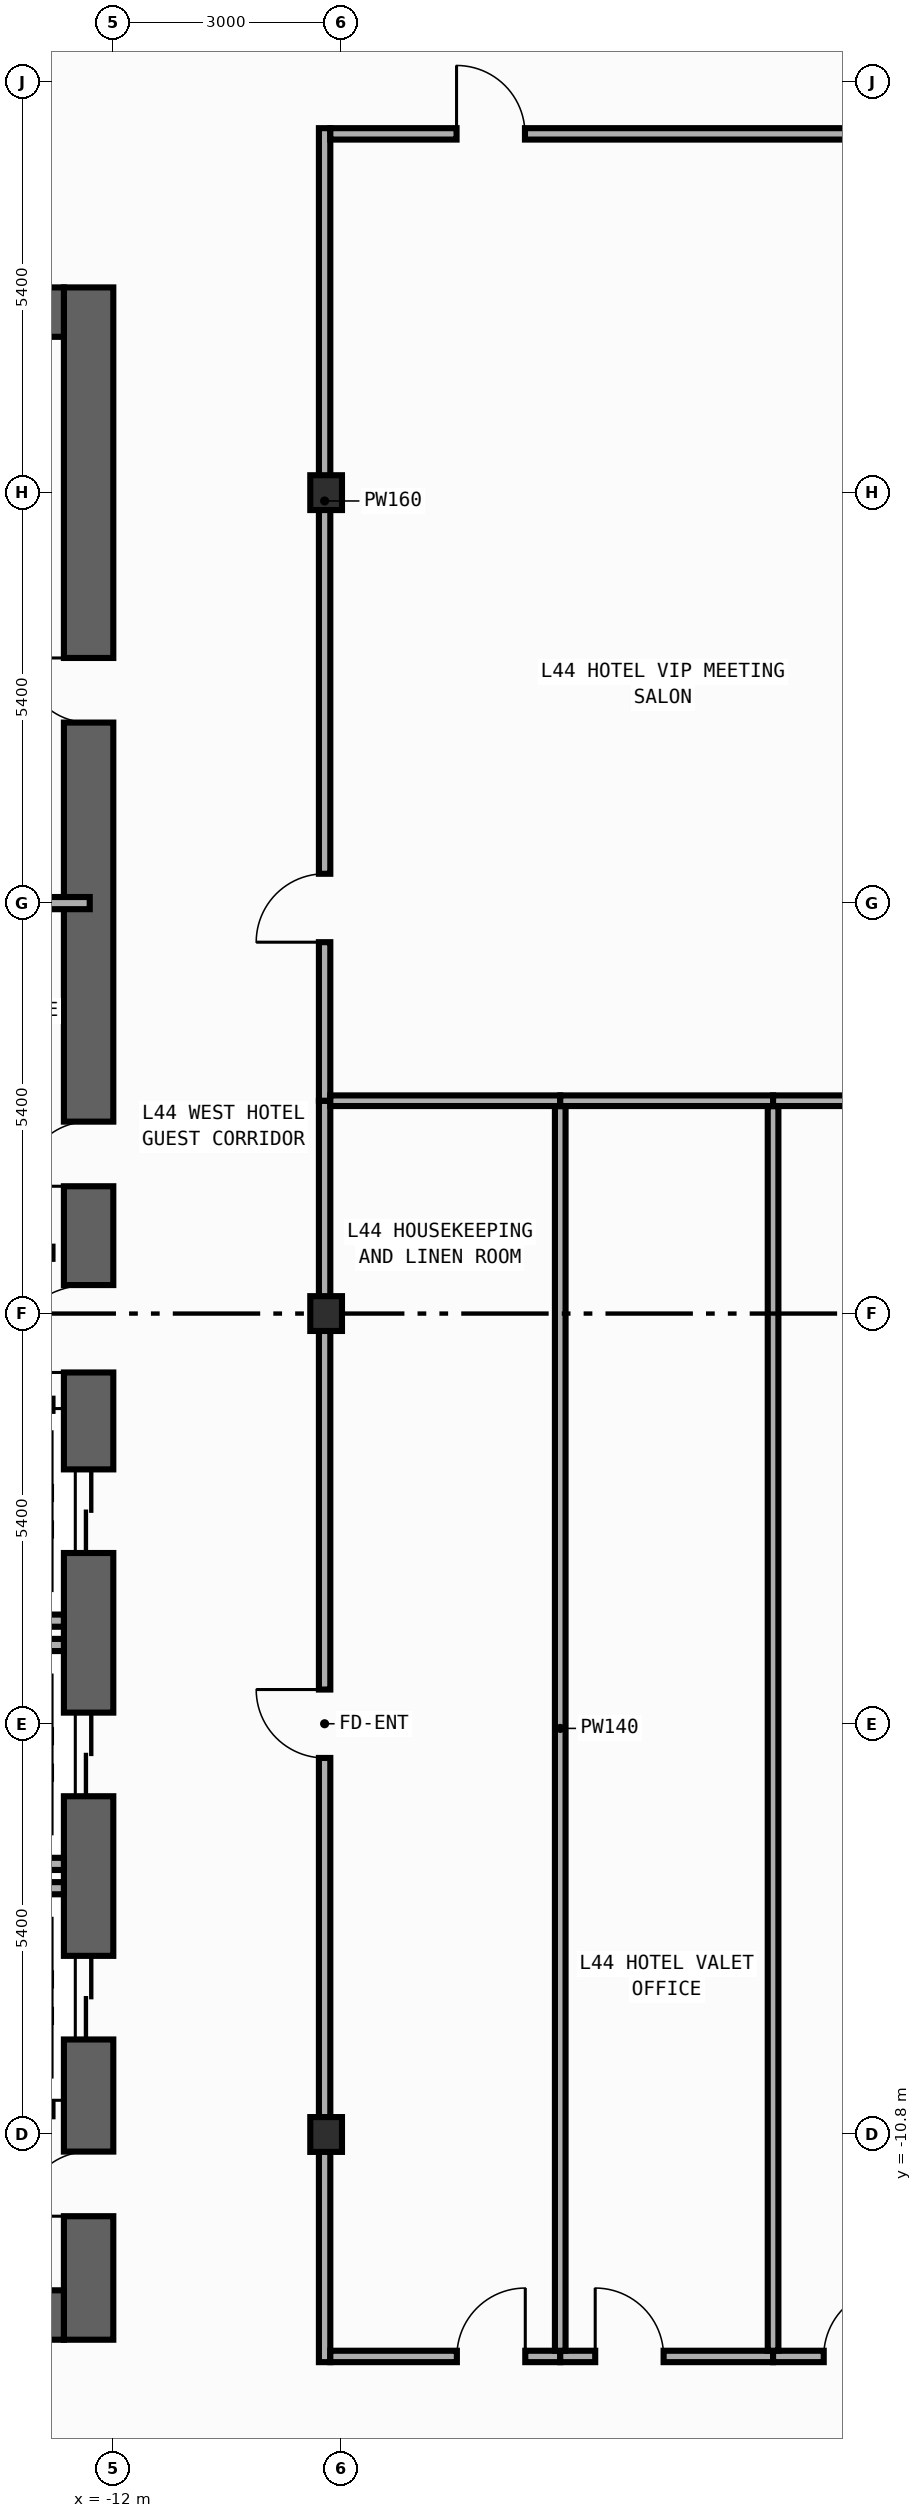
"""IFC4 building model, lengths in metres.
Left out: names, types, materials, properties, quantities, classifications, styles, units other than length and angle.
Written with IfcOpenShell. Run it as: python <this file> out.ifc"""

import sys

from ifc_helpers import new_model, si_unit, direction, frame, frame_2d, origin, origin_2d, place, context, subcontext, project, spatial, rectangle, i_section, extrude, element, fill, save


model = new_model("IFC4")
c1 = context("Model", 3, precision=1e-05, world=origin(), true_north=direction((0.0, 1.0)))
c2 = subcontext(c1, "Body", "Model", "MODEL_VIEW")
j1 = project(units=[si_unit("LENGTHUNIT", "METRE"), si_unit("PLANEANGLEUNIT", "RADIAN")], contexts=[c1])
p1 = place(None, origin())
s1 = spatial("IfcSite", under=j1, at=p1, CompositionType="ELEMENT")
p2 = place(p1, origin())
s2 = spatial("IfcBuilding", under=s1, at=p2, CompositionType="ELEMENT")
p3 = place(p2, frame((0.0, 0.0, 191.6)))
s3 = spatial("IfcBuildingStorey", under=s2, at=p3, CompositionType="ELEMENT", Elevation=191.6)
p4 = place(p3, frame((-12.325, -13.5, 0.0), z_axis=(0.0, 0.0, 1.0), x_axis=(0.0, 1.0, 0.0)))
e1 = element("IfcWall", 1, at=p4, inside=s3, PredefinedType="SHEAR", context=c2, shape_type="SweptSolid", body=[
    extrude(rectangle(XDim=27.0, YDim=0.65, at=frame_2d((13.5, 0.0))), origin(), (0.0, 0.0, 1.0), 3.54),
])
p5 = place(p4, frame((10.35, 0.0, 0.0)))
e2 = element("IfcOpeningElement", 2, at=p5, cuts=e1, PredefinedType="OPENING", context=c2, shape_type="SweptSolid", body=[
    extrude(rectangle(XDim=1.1, YDim=2.2, at=frame_2d((0.55, 1.1))), frame((0.0, 0.335, 0.0), z_axis=(0.0, -1.0, 0.0), x_axis=(1.0, 0.0, 0.0)), (0.0, 0.0, 1.0), 0.67),
])
p6 = place(p4, frame((7.15, 0.0, 0.0)))
e3 = element("IfcOpeningElement", 3, at=p6, cuts=e1, PredefinedType="OPENING", context=c2, shape_type="SweptSolid", body=[
    extrude(rectangle(XDim=1.1, YDim=2.2, at=frame_2d((0.55, 1.1))), frame((0.0, 0.335, 0.0), z_axis=(0.0, -1.0, 0.0), x_axis=(1.0, 0.0, 0.0)), (0.0, 0.0, 1.0), 0.67),
])
p7 = place(p4, frame((3.95, 0.0, 0.0)))
e4 = element("IfcOpeningElement", 4, at=p7, cuts=e1, PredefinedType="OPENING", context=c2, shape_type="SweptSolid", body=[
    extrude(rectangle(XDim=1.1, YDim=2.2, at=frame_2d((0.55, 1.1))), frame((0.0, 0.335, 0.0), z_axis=(0.0, -1.0, 0.0), x_axis=(1.0, 0.0, 0.0)), (0.0, 0.0, 1.0), 0.67),
])
p8 = place(p4, frame((15.175, 0.0, 0.0)))
e5 = element("IfcOpeningElement", 5, at=p8, cuts=e1, PredefinedType="OPENING", context=c2, shape_type="SweptSolid", body=[
    extrude(rectangle(XDim=0.85, YDim=2.1, at=frame_2d((0.425, 1.05))), frame((0.0, 0.335, 0.0), z_axis=(0.0, -1.0, 0.0), x_axis=(1.0, 0.0, 0.0)), (0.0, 0.0, 1.0), 0.67),
])
p9 = place(p4, frame((21.275, 0.0, 0.0)))
e6 = element("IfcOpeningElement", 6, at=p9, cuts=e1, PredefinedType="OPENING", context=c2, shape_type="SweptSolid", body=[
    extrude(rectangle(XDim=0.85, YDim=2.1, at=frame_2d((0.425, 1.05))), frame((0.0, 0.335, 0.0), z_axis=(0.0, -1.0, 0.0), x_axis=(1.0, 0.0, 0.0)), (0.0, 0.0, 1.0), 0.67),
])
p10 = place(p4, frame((12.725, 0.0, 0.0)))
e7 = element("IfcOpeningElement", 7, at=p10, cuts=e1, PredefinedType="OPENING", context=c2, shape_type="SweptSolid", body=[
    extrude(rectangle(XDim=1.15, YDim=2.2, at=frame_2d((0.575, 1.1))), frame((0.0, 0.335, 0.0), z_axis=(0.0, -1.0, 0.0), x_axis=(1.0, 0.0, 0.0)), (0.0, 0.0, 1.0), 0.67),
])
p11 = place(p4, frame((1.625, 0.0, 0.0)))
e8 = element("IfcOpeningElement", 8, at=p11, cuts=e1, PredefinedType="OPENING", context=c2, shape_type="SweptSolid", body=[
    extrude(rectangle(XDim=0.85, YDim=2.1, at=frame_2d((0.425, 1.05))), frame((0.0, 0.335, 0.0), z_axis=(0.0, -1.0, 0.0), x_axis=(1.0, 0.0, 0.0)), (0.0, 0.0, 1.0), 0.67),
])
for number, where, z_axis, x_axis in (
    (9, (-19.75, -13.175, 0.0), (0.0, 0.0, 1.0), (1.0, 0.0, 0.0)),
    (10, (-19.75, 13.175, 0.0), (0.0, 0.0, 1.0), (1.0, 0.0, 0.0)),
):
    element("IfcWall", number, at=place(p3, frame(where, z_axis=z_axis, x_axis=x_axis)), inside=s3, PredefinedType="SHEAR", context=c2, shape_type="SweptSolid", body=[
        extrude(rectangle(XDim=7.1, YDim=0.65, at=frame_2d((3.55, 0.0))), origin(), (0.0, 0.0, 1.0), 3.54),
    ])
for number, where, z_axis, x_axis in (
    (11, (-9.2, -10.8, 0.0), (0.0, 0.0, 1.0), (1.0, 0.0, 0.0)),
    (12, (-9.2, 0.0, 0.0), (0.0, 0.0, 1.0), (1.0, 0.0, 0.0)),
    (13, (-9.2, 10.8, 0.0), (0.0, 0.0, 1.0), (1.0, 0.0, 0.0)),
):
    element("IfcColumn", number, at=place(p3, frame(where, z_axis=z_axis, x_axis=x_axis)), inside=s3, PredefinedType="COLUMN", context=c2, shape_type="SweptSolid", body=[
        extrude(i_section(OverallWidth=0.417, OverallDepth=0.458, WebThickness=0.03, FlangeThickness=0.05, FilletRadius=0.022, at=origin_2d()), origin(), (0.0, 0.0, 1.0), 3.8),
    ])
for number, where, z_axis, x_axis in (
    (14, (-14.99, -4.04, 0.0), (0.0, 0.0, 1.0), (1.0, 0.0, 0.0)),
    (15, (-14.99, -7.24, 0.0), (0.0, 0.0, 1.0), (1.0, 0.0, 0.0)),
    (16, (-14.99, -4.36, 0.0), (0.0, 0.0, 1.0), (1.0, 0.0, 0.0)),
    (17, (-14.99, -7.56, 0.0), (0.0, 0.0, 1.0), (1.0, 0.0, 0.0)),
):
    element("IfcWall", number, at=place(p3, frame(where, z_axis=z_axis, x_axis=x_axis)), inside=s3, PredefinedType="STANDARD", context=c2, shape_type="SweptSolid", body=[
        extrude(rectangle(XDim=2.34, YDim=0.16, at=frame_2d((1.17, 0.0))), origin(), (0.0, 0.0, 1.0), 3.54),
    ])
p12 = place(p3, frame((-15.375, 5.4, 0.0), z_axis=(0.0, 0.0, 1.0), x_axis=(1.0, 0.0, 0.0)))
e18 = element("IfcWall", 18, at=p12, inside=s3, PredefinedType="PARTITIONING", context=c2, shape_type="SweptSolid", body=[
    extrude(rectangle(XDim=3.065, YDim=0.16, at=frame_2d((1.532, 0.0))), origin(), (0.0, 0.0, 1.0), 3.54),
])
p13 = place(p3, frame((-9.22, -13.795, 0.0), z_axis=(0.0, 0.0, 1.0), x_axis=(0.0, 1.0, 0.0)))
e19 = element("IfcWall", 19, at=p13, inside=s3, PredefinedType="PARTITIONING", context=c2, shape_type="SweptSolid", body=[
    extrude(rectangle(XDim=16.595, YDim=0.15, at=frame_2d((8.297, 0.0))), origin(), (0.0, 0.0, 1.0), 2.952),
])
p14 = place(p13, frame((7.949, 0.0, 0.0)))
e20 = element("IfcOpeningElement", 20, at=p14, cuts=e19, PredefinedType="OPENING", context=c2, shape_type="SweptSolid", body=[
    extrude(rectangle(XDim=0.9, YDim=2.15, at=frame_2d((0.45, 1.075))), frame((0.0, 0.085, 0.0), z_axis=(0.0, -1.0, 0.0), x_axis=(1.0, 0.0, 0.0)), (0.0, 0.0, 1.0), 0.17),
])
p15 = place(p3, frame((-9.22, 2.8, 0.0), z_axis=(0.0, 0.0, 1.0), x_axis=(0.0, 1.0, 0.0)))
e21 = element("IfcWall", 21, at=p15, inside=s3, PredefinedType="PARTITIONING", context=c2, shape_type="SweptSolid", body=[
    extrude(rectangle(XDim=12.795, YDim=0.15, at=frame_2d((6.397, 0.0))), origin(), (0.0, 0.0, 1.0), 2.952),
])
p16 = place(p15, frame((2.086, 0.0, 0.0)))
e22 = element("IfcOpeningElement", 22, at=p16, cuts=e21, PredefinedType="OPENING", context=c2, shape_type="SweptSolid", body=[
    extrude(rectangle(XDim=0.9, YDim=2.15, at=frame_2d((0.45, 1.075))), frame((0.0, 0.085, 0.0), z_axis=(0.0, -1.0, 0.0), x_axis=(1.0, 0.0, 0.0)), (0.0, 0.0, 1.0), 0.17),
])
p17 = place(p3, frame((-9.145, 15.52, 0.0), z_axis=(0.0, 0.0, 1.0), x_axis=(1.0, 0.0, 0.0)))
e23 = element("IfcWall", 23, at=p17, inside=s3, PredefinedType="PARTITIONING", context=c2, shape_type="SweptSolid", body=[
    extrude(rectangle(XDim=8.825, YDim=0.15, at=frame_2d((4.413, 0.0))), origin(), (0.0, 0.0, 1.0), 3.54),
])
p18 = place(p17, frame((1.661, 0.0, 0.0)))
e24 = element("IfcOpeningElement", 24, at=p18, cuts=e23, PredefinedType="OPENING", context=c2, shape_type="SweptSolid", body=[
    extrude(rectangle(XDim=0.9, YDim=2.15, at=frame_2d((0.45, 1.075))), frame((0.0, 0.085, 0.0), z_axis=(0.0, -1.0, 0.0), x_axis=(1.0, 0.0, 0.0)), (0.0, 0.0, 1.0), 0.17),
])
p19 = place(p3, frame((-9.145, -13.72, 0.0), z_axis=(0.0, 0.0, 1.0), x_axis=(1.0, 0.0, 0.0)))
e25 = element("IfcWall", 25, at=p19, inside=s3, PredefinedType="PARTITIONING", context=c2, shape_type="SweptSolid", body=[
    extrude(rectangle(XDim=3.025, YDim=0.15, at=frame_2d((1.512, 0.0))), origin(), (0.0, 0.0, 1.0), 3.54),
])
p20 = place(p19, frame((1.665, 0.0, 0.0)))
e26 = element("IfcOpeningElement", 26, at=p20, cuts=e25, PredefinedType="OPENING", context=c2, shape_type="SweptSolid", body=[
    extrude(rectangle(XDim=0.9, YDim=2.15, at=frame_2d((0.45, 1.075))), frame((0.0, 0.085, 0.0), z_axis=(0.0, -1.0, 0.0), x_axis=(1.0, 0.0, 0.0)), (0.0, 0.0, 1.0), 0.17),
])
p21 = place(p3, frame((-6.12, -13.72, 0.0), z_axis=(0.0, 0.0, 1.0), x_axis=(1.0, 0.0, 0.0)))
e27 = element("IfcWall", 27, at=p21, inside=s3, PredefinedType="PARTITIONING", context=c2, shape_type="SweptSolid", body=[
    extrude(rectangle(XDim=2.8, YDim=0.15, at=frame_2d((1.4, 0.0))), origin(), (0.0, 0.0, 1.0), 3.54),
])
p22 = place(p21, frame((0.46, 0.0, 0.0)))
e28 = element("IfcOpeningElement", 28, at=p22, cuts=e27, PredefinedType="OPENING", context=c2, shape_type="SweptSolid", body=[
    extrude(rectangle(XDim=0.9, YDim=2.15, at=frame_2d((0.45, 1.075))), frame((0.0, 0.085, 0.0), z_axis=(0.0, -1.0, 0.0), x_axis=(1.0, 0.0, 0.0)), (0.0, 0.0, 1.0), 0.17),
])
p23 = place(p3, frame((-3.32, -13.72, 0.0), z_axis=(0.0, 0.0, 1.0), x_axis=(1.0, 0.0, 0.0)))
e29 = element("IfcWall", 29, at=p23, inside=s3, PredefinedType="PARTITIONING", context=c2, shape_type="SweptSolid", body=[
    extrude(rectangle(XDim=7.6, YDim=0.15, at=frame_2d((3.8, 0.0))), origin(), (0.0, 0.0, 1.0), 3.54),
])
p24 = place(p23, frame((0.667, 0.0, 0.0)))
e30 = element("IfcOpeningElement", 30, at=p24, cuts=e29, PredefinedType="OPENING", context=c2, shape_type="SweptSolid", body=[
    extrude(rectangle(XDim=0.9, YDim=2.15, at=frame_2d((0.45, 1.075))), frame((0.0, 0.085, 0.0), z_axis=(0.0, -1.0, 0.0), x_axis=(1.0, 0.0, 0.0)), (0.0, 0.0, 1.0), 0.17),
])
p25 = place(p3, frame((-6.12, -13.645, 0.0), z_axis=(0.0, 0.0, 1.0), x_axis=(0.0, 1.0, 0.0)))
e31 = element("IfcWall", 31, at=p25, inside=s3, PredefinedType="PARTITIONING", context=c2, shape_type="SweptSolid", body=[
    extrude(rectangle(XDim=16.375, YDim=0.14, at=frame_2d((8.188, 0.0))), origin(), (0.0, 0.0, 1.0), 3.54),
])
p26 = place(p3, frame((-9.145, 2.8, 0.0), z_axis=(0.0, 0.0, 1.0), x_axis=(1.0, 0.0, 0.0)))
e32 = element("IfcWall", 32, at=p26, inside=s3, PredefinedType="PARTITIONING", context=c2, shape_type="SweptSolid", body=[
    extrude(rectangle(XDim=3.025, YDim=0.14, at=frame_2d((1.512, 0.0))), origin(), (0.0, 0.0, 1.0), 3.54),
])
p27 = place(p3, frame((-3.32, -13.645, 0.0), z_axis=(0.0, 0.0, 1.0), x_axis=(0.0, 1.0, 0.0)))
e33 = element("IfcWall", 33, at=p27, inside=s3, PredefinedType="PARTITIONING", context=c2, shape_type="SweptSolid", body=[
    extrude(rectangle(XDim=16.375, YDim=0.14, at=frame_2d((8.188, 0.0))), origin(), (0.0, 0.0, 1.0), 3.54),
])
p28 = place(p3, frame((-6.12, 2.8, 0.0), z_axis=(0.0, 0.0, 1.0), x_axis=(1.0, 0.0, 0.0)))
e34 = element("IfcWall", 34, at=p28, inside=s3, PredefinedType="PARTITIONING", context=c2, shape_type="SweptSolid", body=[
    extrude(rectangle(XDim=2.8, YDim=0.14, at=frame_2d((1.4, 0.0))), origin(), (0.0, 0.0, 1.0), 3.54),
])
p29 = place(p3, frame((-3.32, 2.8, 0.0), z_axis=(0.0, 0.0, 1.0), x_axis=(1.0, 0.0, 0.0)))
e35 = element("IfcWall", 35, at=p29, inside=s3, PredefinedType="PARTITIONING", context=c2, shape_type="SweptSolid", body=[
    extrude(rectangle(XDim=3.0, YDim=0.14, at=frame_2d((1.5, 0.0))), origin(), (0.0, 0.0, 1.0), 3.54),
])
p30 = place(p5, origin())
e36 = element("IfcDoor", 36, at=p30, inside=s3, OperationType="DOUBLE_DOOR_SLIDING", PredefinedType="DOOR", context=c2, shape_type="SweptSolid", body=[
    extrude(rectangle(XDim=1.1, YDim=2.2, at=frame_2d((0.55, 1.1))), frame((0.0, 0.025, 0.0), z_axis=(0.0, -1.0, 0.0), x_axis=(1.0, 0.0, 0.0)), (0.0, 0.0, 1.0), 0.05),
])
fill(e2, e36)
p31 = place(p6, origin())
e37 = element("IfcDoor", 37, at=p31, inside=s3, OperationType="DOUBLE_DOOR_SLIDING", PredefinedType="DOOR", context=c2, shape_type="SweptSolid", body=[
    extrude(rectangle(XDim=1.1, YDim=2.2, at=frame_2d((0.55, 1.1))), frame((0.0, 0.025, 0.0), z_axis=(0.0, -1.0, 0.0), x_axis=(1.0, 0.0, 0.0)), (0.0, 0.0, 1.0), 0.05),
])
fill(e3, e37)
p32 = place(p7, origin())
e38 = element("IfcDoor", 38, at=p32, inside=s3, OperationType="DOUBLE_DOOR_SLIDING", PredefinedType="DOOR", context=c2, shape_type="SweptSolid", body=[
    extrude(rectangle(XDim=1.1, YDim=2.2, at=frame_2d((0.55, 1.1))), frame((0.0, 0.025, 0.0), z_axis=(0.0, -1.0, 0.0), x_axis=(1.0, 0.0, 0.0)), (0.0, 0.0, 1.0), 0.05),
])
fill(e4, e38)
p33 = place(p8, origin())
e39 = element("IfcDoor", 39, at=p33, inside=s3, OperationType="SINGLE_SWING_LEFT", PredefinedType="DOOR", context=c2, shape_type="SweptSolid", body=[
    extrude(rectangle(XDim=0.85, YDim=2.1, at=frame_2d((0.425, 1.05))), frame((0.0, 0.025, 0.0), z_axis=(0.0, -1.0, 0.0), x_axis=(1.0, 0.0, 0.0)), (0.0, 0.0, 1.0), 0.05),
])
fill(e5, e39)
p34 = place(p9, origin())
e40 = element("IfcDoor", 40, at=p34, inside=s3, OperationType="SINGLE_SWING_RIGHT", PredefinedType="DOOR", context=c2, shape_type="SweptSolid", body=[
    extrude(rectangle(XDim=0.85, YDim=2.1, at=frame_2d((0.425, 1.05))), frame((0.0, 0.025, 0.0), z_axis=(0.0, -1.0, 0.0), x_axis=(1.0, 0.0, 0.0)), (0.0, 0.0, 1.0), 0.05),
])
fill(e6, e40)
p35 = place(p10, origin())
e41 = element("IfcDoor", 41, at=p35, inside=s3, OperationType="SINGLE_SWING_LEFT", PredefinedType="DOOR", context=c2, shape_type="SweptSolid", body=[
    extrude(rectangle(XDim=1.15, YDim=2.2, at=frame_2d((0.575, 1.1))), frame((0.0, 0.025, 0.0), z_axis=(0.0, -1.0, 0.0), x_axis=(1.0, 0.0, 0.0)), (0.0, 0.0, 1.0), 0.05),
])
fill(e7, e41)
p36 = place(p11, origin())
e42 = element("IfcDoor", 42, at=p36, inside=s3, OperationType="SINGLE_SWING_LEFT", PredefinedType="DOOR", context=c2, shape_type="SweptSolid", body=[
    extrude(rectangle(XDim=0.85, YDim=2.1, at=frame_2d((0.425, 1.05))), frame((0.0, 0.025, 0.0), z_axis=(0.0, -1.0, 0.0), x_axis=(1.0, 0.0, 0.0)), (0.0, 0.0, 1.0), 0.05),
])
fill(e8, e42)
p37 = place(p14, origin())
e43 = element("IfcDoor", 43, at=p37, inside=s3, OperationType="SINGLE_SWING_RIGHT", PredefinedType="DOOR", context=c2, shape_type="SweptSolid", body=[
    extrude(rectangle(XDim=0.9, YDim=2.15, at=frame_2d((0.45, 1.075))), frame((0.0, 0.025, 0.0), z_axis=(0.0, -1.0, 0.0), x_axis=(1.0, 0.0, 0.0)), (0.0, 0.0, 1.0), 0.05),
])
fill(e20, e43)
p38 = place(p16, origin())
e44 = element("IfcDoor", 44, at=p38, inside=s3, OperationType="SINGLE_SWING_LEFT", PredefinedType="DOOR", context=c2, shape_type="SweptSolid", body=[
    extrude(rectangle(XDim=0.9, YDim=2.15, at=frame_2d((0.45, 1.075))), frame((0.0, 0.025, 0.0), z_axis=(0.0, -1.0, 0.0), x_axis=(1.0, 0.0, 0.0)), (0.0, 0.0, 1.0), 0.05),
])
fill(e22, e44)
p39 = place(p18, origin())
e45 = element("IfcDoor", 45, at=p39, inside=s3, OperationType="SINGLE_SWING_LEFT", PredefinedType="DOOR", context=c2, shape_type="SweptSolid", body=[
    extrude(rectangle(XDim=0.9, YDim=2.15, at=frame_2d((0.45, 1.075))), frame((0.0, 0.025, 0.0), z_axis=(0.0, -1.0, 0.0), x_axis=(1.0, 0.0, 0.0)), (0.0, 0.0, 1.0), 0.05),
])
fill(e24, e45)
p40 = place(p20, origin())
e46 = element("IfcDoor", 46, at=p40, inside=s3, OperationType="SINGLE_SWING_RIGHT", PredefinedType="DOOR", context=c2, shape_type="SweptSolid", body=[
    extrude(rectangle(XDim=0.9, YDim=2.15, at=frame_2d((0.45, 1.075))), frame((0.0, 0.025, 0.0), z_axis=(0.0, -1.0, 0.0), x_axis=(1.0, 0.0, 0.0)), (0.0, 0.0, 1.0), 0.05),
])
fill(e26, e46)
p41 = place(p22, origin())
e47 = element("IfcDoor", 47, at=p41, inside=s3, OperationType="SINGLE_SWING_LEFT", PredefinedType="DOOR", context=c2, shape_type="SweptSolid", body=[
    extrude(rectangle(XDim=0.9, YDim=2.15, at=frame_2d((0.45, 1.075))), frame((0.0, 0.025, 0.0), z_axis=(0.0, -1.0, 0.0), x_axis=(1.0, 0.0, 0.0)), (0.0, 0.0, 1.0), 0.05),
])
fill(e28, e47)
p42 = place(p24, origin())
e48 = element("IfcDoor", 48, at=p42, inside=s3, OperationType="SINGLE_SWING_RIGHT", PredefinedType="DOOR", context=c2, shape_type="SweptSolid", body=[
    extrude(rectangle(XDim=0.9, YDim=2.15, at=frame_2d((0.45, 1.075))), frame((0.0, 0.025, 0.0), z_axis=(0.0, -1.0, 0.0), x_axis=(1.0, 0.0, 0.0)), (0.0, 0.0, 1.0), 0.05),
])
fill(e30, e48)
save(model, sys.argv[1])
